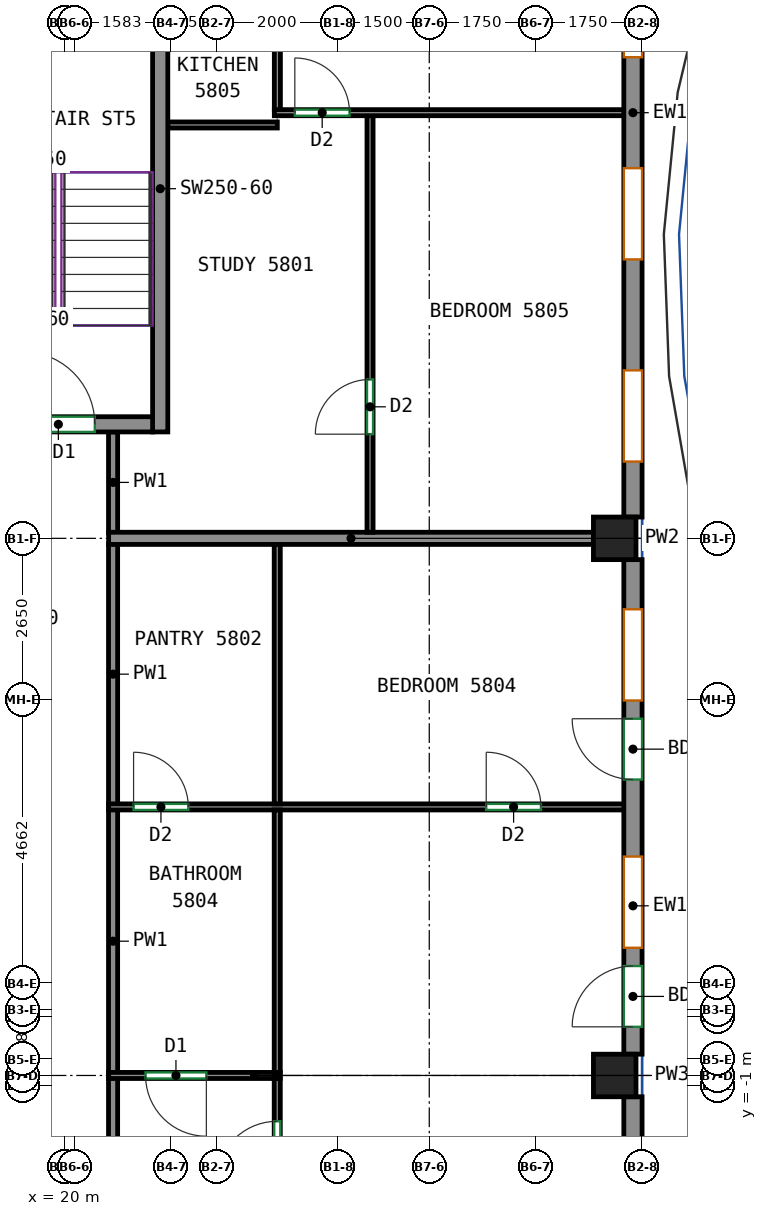
"""IFC4 building model, lengths in metres.
Left out: names, types, materials, properties, quantities, classifications, styles, units other than length and angle.
Written with IfcOpenShell. Run it as: python <this file> out.ifc"""

import sys

from ifc_helpers import new_model, si_unit, direction, frame, frame_2d, origin, origin_2d, place, context, subcontext, project, spatial, rectangle, extrude, source, transform, mapped, element, fill, save


model = new_model("IFC4")
c1 = context("Model", 3, precision=1e-05, world=origin(), true_north=direction((0.0, 1.0)))
c2 = subcontext(c1, "Body", "Model", "MODEL_VIEW")
j1 = project(units=[si_unit("LENGTHUNIT", "METRE"), si_unit("PLANEANGLEUNIT", "RADIAN")], contexts=[c1])
p1 = place(None, origin())
s1 = spatial("IfcSite", under=j1, at=p1, CompositionType="ELEMENT")
p2 = place(p1, origin())
s2 = spatial("IfcBuilding", under=s1, at=p2, CompositionType="ELEMENT")
p3 = place(p2, frame((0.0, 0.0, 242.4)))
s3 = spatial("IfcBuildingStorey", under=s2, at=p3, CompositionType="ELEMENT", Elevation=242.4)
m1 = source(origin(), c2, "Body", "SweptSolid", [
    extrude(rectangle(XDim=0.7, YDim=0.7, at=origin_2d()), origin(), (0.0, 0.0, 1.0), 3.12),
])
for number, where, z_axis, x_axis in (
    (1, (29.05, -0.833, 0.0), (0.0, 0.0, 1.0), (1.0, 0.0, 0.0)),
    (2, (29.05, 8.0, 0.0), (0.0, 0.0, 1.0), (1.0, 0.0, 0.0)),
):
    element("IfcColumn", number, at=place(p3, frame(where, z_axis=z_axis, x_axis=x_axis)), inside=s3, PredefinedType="COLUMN", context=c2, shape_type="MappedRepresentation", body=[
        mapped(m1, transform((0.0, 0.0, 0.0))),
    ])
m2 = source(origin(), c2, "Body", "SweptSolid", [
    extrude(rectangle(XDim=8.0, YDim=0.25, at=frame_2d((4.0, 0.0))), origin(), (0.0, 0.0, 1.0), 3.12),
])
p4 = place(p3, frame((21.575, 9.75, 0.0), z_axis=(0.0, 0.0, 1.0), x_axis=(0.0, 1.0, 0.0)))
e3 = element("IfcWall", 3, at=p4, inside=s3, PredefinedType="SHEAR", context=c2, shape_type="MappedRepresentation", body=[
    mapped(m2, transform((0.0, 0.0, 0.0))),
])
m3 = source(origin(), c2, "Body", "SweptSolid", [
    extrude(rectangle(XDim=3.1, YDim=0.25, at=frame_2d((1.55, 0.0))), origin(), (0.0, 0.0, 1.0), 3.12),
])
p5 = place(p3, frame((18.35, 9.875, 0.0), z_axis=(0.0, 0.0, 1.0), x_axis=(1.0, 0.0, 0.0)))
e4 = element("IfcWall", 4, at=p5, inside=s3, PredefinedType="SHEAR", context=c2, shape_type="MappedRepresentation", body=[
    mapped(m3, transform((0.0, 0.0, 0.0))),
])
p6 = place(p5, frame((0.95, 0.0, 0.0)))
e5 = element("IfcOpeningElement", 5, at=p6, cuts=e4, PredefinedType="OPENING", context=c2, shape_type="SweptSolid", body=[
    extrude(rectangle(XDim=1.2, YDim=2.1, at=frame_2d((0.6, 1.05))), frame((0.0, 0.135, 0.0), z_axis=(0.0, -1.0, 0.0), x_axis=(1.0, 0.0, 0.0)), (0.0, 0.0, 1.0), 0.27),
])
m4 = source(origin(), c2, "Body", "SweptSolid", [
    extrude(rectangle(XDim=8.133, YDim=0.3, at=frame_2d((4.067, 0.0))), origin(), (0.0, 0.0, 1.0), 3.12),
])
p7 = place(p3, frame((29.35, -9.317, 0.0), z_axis=(0.0, 0.0, 1.0), x_axis=(0.0, 1.0, 0.0)))
e6 = element("IfcWall", 6, at=p7, inside=s3, PredefinedType="SOLIDWALL", context=c2, shape_type="MappedRepresentation", body=[
    mapped(m4, transform((0.0, 0.0, 0.0))),
])
p8 = place(p7, frame((1.75, 0.0, 0.8)))
e7 = element("IfcOpeningElement", 7, at=p8, cuts=e6, PredefinedType="OPENING", context=c2, shape_type="SweptSolid", body=[
    extrude(rectangle(XDim=1.5, YDim=2.05, at=frame_2d((0.75, 1.025))), frame((0.0, 0.16, 0.0), z_axis=(0.0, -1.0, 0.0), x_axis=(1.0, 0.0, 0.0)), (0.0, 0.0, 1.0), 0.32),
])
p9 = place(p7, frame((5.817, 0.0, 0.8)))
e8 = element("IfcOpeningElement", 8, at=p9, cuts=e6, PredefinedType="OPENING", context=c2, shape_type="SweptSolid", body=[
    extrude(rectangle(XDim=1.5, YDim=2.05, at=frame_2d((0.75, 1.025))), frame((0.0, 0.16, 0.0), z_axis=(0.0, -1.0, 0.0), x_axis=(1.0, 0.0, 0.0)), (0.0, 0.0, 1.0), 0.32),
])
p10 = place(p7, frame((4.517, 0.0, 0.0)))
e9 = element("IfcOpeningElement", 9, at=p10, cuts=e6, PredefinedType="OPENING", context=c2, shape_type="SweptSolid", body=[
    extrude(rectangle(XDim=1.0, YDim=2.1, at=frame_2d((0.5, 1.05))), frame((0.0, 0.16, 0.0), z_axis=(0.0, -1.0, 0.0), x_axis=(1.0, 0.0, 0.0)), (0.0, 0.0, 1.0), 0.32),
])
p11 = place(p3, frame((29.35, -0.483, 0.0), z_axis=(0.0, 0.0, 1.0), x_axis=(0.0, 1.0, 0.0)))
e10 = element("IfcWall", 10, at=p11, inside=s3, PredefinedType="SOLIDWALL", context=c2, shape_type="MappedRepresentation", body=[
    mapped(m4, transform((0.0, 0.0, 0.0))),
])
p12 = place(p11, frame((1.75, 0.0, 0.8)))
e11 = element("IfcOpeningElement", 11, at=p12, cuts=e10, PredefinedType="OPENING", context=c2, shape_type="SweptSolid", body=[
    extrude(rectangle(XDim=1.5, YDim=2.05, at=frame_2d((0.75, 1.025))), frame((0.0, 0.16, 0.0), z_axis=(0.0, -1.0, 0.0), x_axis=(1.0, 0.0, 0.0)), (0.0, 0.0, 1.0), 0.32),
])
p13 = place(p11, frame((0.45, 0.0, 0.0)))
e12 = element("IfcOpeningElement", 12, at=p13, cuts=e10, PredefinedType="OPENING", context=c2, shape_type="SweptSolid", body=[
    extrude(rectangle(XDim=1.0, YDim=2.1, at=frame_2d((0.5, 1.05))), frame((0.0, 0.16, 0.0), z_axis=(0.0, -1.0, 0.0), x_axis=(1.0, 0.0, 0.0)), (0.0, 0.0, 1.0), 0.32),
])
p14 = place(p11, frame((5.817, 0.0, 0.8)))
e13 = element("IfcOpeningElement", 13, at=p14, cuts=e10, PredefinedType="OPENING", context=c2, shape_type="SweptSolid", body=[
    extrude(rectangle(XDim=1.5, YDim=2.05, at=frame_2d((0.75, 1.025))), frame((0.0, 0.16, 0.0), z_axis=(0.0, -1.0, 0.0), x_axis=(1.0, 0.0, 0.0)), (0.0, 0.0, 1.0), 0.32),
])
p15 = place(p11, frame((4.517, 0.0, 0.0)))
e14 = element("IfcOpeningElement", 14, at=p15, cuts=e10, PredefinedType="OPENING", context=c2, shape_type="SweptSolid", body=[
    extrude(rectangle(XDim=1.0, YDim=2.1, at=frame_2d((0.5, 1.05))), frame((0.0, 0.16, 0.0), z_axis=(0.0, -1.0, 0.0), x_axis=(1.0, 0.0, 0.0)), (0.0, 0.0, 1.0), 0.32),
])
m5 = source(origin(), c2, "Body", "SweptSolid", [
    extrude(rectangle(XDim=13.3, YDim=0.3, at=frame_2d((6.65, 0.0))), origin(), (0.0, 0.0, 1.0), 3.12),
])
p16 = place(p3, frame((29.35, 8.35, 0.0), z_axis=(0.0, 0.0, 1.0), x_axis=(0.0, 1.0, 0.0)))
e15 = element("IfcWall", 15, at=p16, inside=s3, PredefinedType="SOLIDWALL", context=c2, shape_type="MappedRepresentation", body=[
    mapped(m5, transform((0.0, 0.0, 0.0))),
])
p17 = place(p16, frame((0.913, 0.0, 0.8)))
e16 = element("IfcOpeningElement", 16, at=p17, cuts=e15, PredefinedType="OPENING", context=c2, shape_type="SweptSolid", body=[
    extrude(rectangle(XDim=1.5, YDim=2.05, at=frame_2d((0.75, 1.025))), frame((0.0, 0.16, 0.0), z_axis=(0.0, -1.0, 0.0), x_axis=(1.0, 0.0, 0.0)), (0.0, 0.0, 1.0), 0.32),
])
p18 = place(p16, frame((4.238, 0.0, 0.8)))
e17 = element("IfcOpeningElement", 17, at=p18, cuts=e15, PredefinedType="OPENING", context=c2, shape_type="SweptSolid", body=[
    extrude(rectangle(XDim=1.5, YDim=2.05, at=frame_2d((0.75, 1.025))), frame((0.0, 0.16, 0.0), z_axis=(0.0, -1.0, 0.0), x_axis=(1.0, 0.0, 0.0)), (0.0, 0.0, 1.0), 0.32),
])
p19 = place(p16, frame((7.562, 0.0, 0.8)))
e18 = element("IfcOpeningElement", 18, at=p19, cuts=e15, PredefinedType="OPENING", context=c2, shape_type="SweptSolid", body=[
    extrude(rectangle(XDim=1.5, YDim=2.05, at=frame_2d((0.75, 1.025))), frame((0.0, 0.16, 0.0), z_axis=(0.0, -1.0, 0.0), x_axis=(1.0, 0.0, 0.0)), (0.0, 0.0, 1.0), 0.32),
])
p20 = place(p16, frame((10.887, 0.0, 0.8)))
e19 = element("IfcOpeningElement", 19, at=p20, cuts=e15, PredefinedType="OPENING", context=c2, shape_type="SweptSolid", body=[
    extrude(rectangle(XDim=1.5, YDim=2.05, at=frame_2d((0.75, 1.025))), frame((0.0, 0.16, 0.0), z_axis=(0.0, -1.0, 0.0), x_axis=(1.0, 0.0, 0.0)), (0.0, 0.0, 1.0), 0.32),
])
p21 = place(p3, frame((20.8, -5.16, 0.0), z_axis=(0.0, 0.0, 1.0), x_axis=(0.0, 1.0, 0.0)))
e20 = element("IfcWall", 20, at=p21, inside=s3, PredefinedType="PARTITIONING", context=c2, shape_type="SweptSolid", body=[
    extrude(rectangle(XDim=4.287, YDim=0.15, at=frame_2d((2.144, 0.0))), origin(), (0.0, 0.0, 1.0), 3.12),
])
p22 = place(p21, frame((2.262, 0.0, 0.0)))
e21 = element("IfcOpeningElement", 21, at=p22, cuts=e20, PredefinedType="OPENING", context=c2, shape_type="SweptSolid", body=[
    extrude(rectangle(XDim=1.0, YDim=2.1, at=frame_2d((0.5, 1.05))), frame((0.0, 0.085, 0.0), z_axis=(0.0, -1.0, 0.0), x_axis=(1.0, 0.0, 0.0)), (0.0, 0.0, 1.0), 0.17),
])
p23 = place(p3, frame((20.8, -0.793, 0.0), z_axis=(0.0, 0.0, 1.0), x_axis=(0.0, 1.0, 0.0)))
e22 = element("IfcWall", 22, at=p23, inside=s3, PredefinedType="PARTITIONING", context=c2, shape_type="SweptSolid", body=[
    extrude(rectangle(XDim=4.336, YDim=0.15, at=frame_2d((2.168, 0.0))), origin(), (0.0, 0.0, 1.0), 3.12),
])
p24 = place(p3, frame((20.8, 3.623, 0.0), z_axis=(0.0, 0.0, 1.0), x_axis=(0.0, 1.0, 0.0)))
e23 = element("IfcWall", 23, at=p24, inside=s3, PredefinedType="PARTITIONING", context=c2, shape_type="SweptSolid", body=[
    extrude(rectangle(XDim=4.287, YDim=0.15, at=frame_2d((2.144, 0.0))), origin(), (0.0, 0.0, 1.0), 3.12),
])
p25 = place(p3, frame((20.8, 8.09, 0.0), z_axis=(0.0, 0.0, 1.0), x_axis=(0.0, 1.0, 0.0)))
e24 = element("IfcWall", 24, at=p25, inside=s3, PredefinedType="PARTITIONING", context=c2, shape_type="SweptSolid", body=[
    extrude(rectangle(XDim=1.66, YDim=0.15, at=frame_2d((0.83, 0.0))), origin(), (0.0, 0.0, 1.0), 3.12),
])
p26 = place(p3, frame((23.55, -0.833, 0.0), z_axis=(0.0, 0.0, 1.0), x_axis=(-1.0, 0.0, 0.0)))
e25 = element("IfcWall", 25, at=p26, inside=s3, PredefinedType="PARTITIONING", context=c2, shape_type="SweptSolid", body=[
    extrude(rectangle(XDim=2.823, YDim=0.1, at=frame_2d((1.412, 0.0))), origin(), (0.0, 0.0, 1.0), 2.57),
])
p27 = place(p26, frame((1.216, 0.0, 0.0)))
e26 = element("IfcOpeningElement", 26, at=p27, cuts=e25, PredefinedType="OPENING", context=c2, shape_type="SweptSolid", body=[
    extrude(rectangle(XDim=1.0, YDim=2.1, at=frame_2d((0.5, 1.05))), frame((0.0, 0.06, 0.0), z_axis=(0.0, -1.0, 0.0), x_axis=(1.0, 0.0, 0.0)), (0.0, 0.0, 1.0), 0.12),
])
p28 = place(p3, frame((23.5, -5.2, 0.0), z_axis=(0.0, 0.0, 1.0), x_axis=(0.0, 1.0, 0.0)))
e27 = element("IfcWall", 27, at=p28, inside=s3, PredefinedType="PARTITIONING", context=c2, shape_type="SweptSolid", body=[
    extrude(rectangle(XDim=4.317, YDim=0.1, at=frame_2d((2.158, 0.0))), origin(), (0.0, 0.0, 1.0), 3.12),
])
p29 = place(p28, frame((2.614, 0.0, 0.0)))
e28 = element("IfcOpeningElement", 28, at=p29, cuts=e27, PredefinedType="OPENING", context=c2, shape_type="SweptSolid", body=[
    extrude(rectangle(XDim=1.0, YDim=2.1, at=frame_2d((0.5, 1.05))), frame((0.0, 0.06, 0.0), z_axis=(0.0, -1.0, 0.0), x_axis=(1.0, 0.0, 0.0)), (0.0, 0.0, 1.0), 0.12),
])
p30 = place(p3, frame((20.727, 3.583, 0.0), z_axis=(0.0, 0.0, 1.0), x_axis=(1.0, 0.0, 0.0)))
e29 = element("IfcWall", 29, at=p30, inside=s3, PredefinedType="PARTITIONING", context=c2, shape_type="SweptSolid", body=[
    extrude(rectangle(XDim=8.523, YDim=0.1, at=frame_2d((4.261, 0.0))), origin(), (0.0, 0.0, 1.0), 3.12),
])
p31 = place(p30, frame((0.41, 0.0, 0.0)))
e30 = element("IfcOpeningElement", 30, at=p31, cuts=e29, PredefinedType="OPENING", context=c2, shape_type="SweptSolid", body=[
    extrude(rectangle(XDim=0.9, YDim=2.1, at=frame_2d((0.45, 1.05))), frame((0.0, 0.06, 0.0), z_axis=(0.0, -1.0, 0.0), x_axis=(1.0, 0.0, 0.0)), (0.0, 0.0, 1.0), 0.12),
])
p32 = place(p30, frame((6.21, 0.0, 0.0)))
e31 = element("IfcOpeningElement", 31, at=p32, cuts=e29, PredefinedType="OPENING", context=c2, shape_type="SweptSolid", body=[
    extrude(rectangle(XDim=0.9, YDim=2.1, at=frame_2d((0.45, 1.05))), frame((0.0, 0.06, 0.0), z_axis=(0.0, -1.0, 0.0), x_axis=(1.0, 0.0, 0.0)), (0.0, 0.0, 1.0), 0.12),
])
p33 = place(p3, frame((23.5, -0.783, 0.0), z_axis=(0.0, 0.0, 1.0), x_axis=(0.0, 1.0, 0.0)))
e32 = element("IfcWall", 32, at=p33, inside=s3, PredefinedType="PARTITIONING", context=c2, shape_type="SweptSolid", body=[
    extrude(rectangle(XDim=4.316, YDim=0.1, at=frame_2d((2.158, 0.0))), origin(), (0.0, 0.0, 1.0), 3.12),
])
p34 = place(p3, frame((23.5, 3.633, 0.0), z_axis=(0.0, 0.0, 1.0), x_axis=(0.0, 1.0, 0.0)))
e33 = element("IfcWall", 33, at=p34, inside=s3, PredefinedType="PARTITIONING", context=c2, shape_type="SweptSolid", body=[
    extrude(rectangle(XDim=4.267, YDim=0.1, at=frame_2d((2.133, 0.0))), origin(), (0.0, 0.0, 1.0), 3.12),
])
p35 = place(p3, frame((20.727, 8.0, 0.0), z_axis=(0.0, 0.0, 1.0), x_axis=(1.0, 0.0, 0.0)))
e34 = element("IfcWall", 34, at=p35, inside=s3, PredefinedType="PARTITIONING", context=c2, shape_type="SweptSolid", body=[
    extrude(rectangle(XDim=7.973, YDim=0.2, at=frame_2d((3.986, 0.0))), origin(), (0.0, 0.0, 1.0), 2.57),
])
p36 = place(p3, frame((25.026, 8.1, 0.0), z_axis=(0.0, 0.0, 1.0), x_axis=(0.0, 1.0, 0.0)))
e35 = element("IfcWall", 35, at=p36, inside=s3, PredefinedType="PARTITIONING", context=c2, shape_type="SweptSolid", body=[
    extrude(rectangle(XDim=6.85, YDim=0.1, at=frame_2d((3.425, 0.0))), origin(), (0.0, 0.0, 1.0), 3.12),
])
p37 = place(p36, frame((1.613, 0.0, 0.0)))
e36 = element("IfcOpeningElement", 36, at=p37, cuts=e35, PredefinedType="OPENING", context=c2, shape_type="SweptSolid", body=[
    extrude(rectangle(XDim=0.9, YDim=2.1, at=frame_2d((0.45, 1.05))), frame((0.0, 0.06, 0.0), z_axis=(0.0, -1.0, 0.0), x_axis=(1.0, 0.0, 0.0)), (0.0, 0.0, 1.0), 0.12),
])
p38 = place(p3, frame((23.452, 15.0, 0.0), z_axis=(0.0, 0.0, 1.0), x_axis=(1.0, 0.0, 0.0)))
e37 = element("IfcWall", 37, at=p38, inside=s3, PredefinedType="PARTITIONING", context=c2, shape_type="SweptSolid", body=[
    extrude(rectangle(XDim=5.798, YDim=0.1, at=frame_2d((2.899, 0.0))), origin(), (0.0, 0.0, 1.0), 3.12),
])
p39 = place(p38, frame((0.337, 0.0, 0.0)))
e38 = element("IfcOpeningElement", 38, at=p39, cuts=e37, PredefinedType="OPENING", context=c2, shape_type="SweptSolid", body=[
    extrude(rectangle(XDim=0.9, YDim=2.1, at=frame_2d((0.45, 1.05))), frame((0.0, 0.06, 0.0), z_axis=(0.0, -1.0, 0.0), x_axis=(1.0, 0.0, 0.0)), (0.0, 0.0, 1.0), 0.12),
])
p40 = place(p3, frame((23.501, 14.798, 0.0), z_axis=(0.0, 0.0, 1.0), x_axis=(-1.0, 0.0, 0.0)))
e39 = element("IfcWall", 39, at=p40, inside=s3, PredefinedType="PARTITIONING", context=c2, shape_type="SweptSolid", body=[
    extrude(rectangle(XDim=1.801, YDim=0.1, at=frame_2d((0.9, 0.0))), origin(), (0.0, 0.0, 1.0), 3.12),
])
p41 = place(p3, frame((23.502, 15.05, 0.0), z_axis=(0.0, 0.0, 1.0), x_axis=(0.0, 1.0, 0.0)))
e40 = element("IfcWall", 40, at=p41, inside=s3, PredefinedType="PARTITIONING", context=c2, shape_type="SweptSolid", body=[
    extrude(rectangle(XDim=2.158, YDim=0.1, at=frame_2d((1.079, 0.0))), origin(), (0.0, 0.0, 1.0), 3.12),
])
p42 = place(p12, origin())
e41 = element("IfcWindow", 41, at=p42, inside=s3, PartitioningType="SINGLE_PANEL", PredefinedType="WINDOW", context=c2, shape_type="SweptSolid", body=[
    extrude(rectangle(XDim=1.5, YDim=2.05, at=frame_2d((0.75, 1.025))), frame((0.0, 0.03, 0.0), z_axis=(0.0, -1.0, 0.0), x_axis=(1.0, 0.0, 0.0)), (0.0, 0.0, 1.0), 0.06),
])
fill(e11, e41)
p43 = place(p13, origin())
e42 = element("IfcDoor", 42, at=p43, inside=s3, OperationType="SINGLE_SWING_LEFT", PredefinedType="DOOR", context=c2, shape_type="SweptSolid", body=[
    extrude(rectangle(XDim=1.0, YDim=2.1, at=frame_2d((0.5, 1.05))), frame((0.0, 0.025, 0.0), z_axis=(0.0, -1.0, 0.0), x_axis=(1.0, 0.0, 0.0)), (0.0, 0.0, 1.0), 0.05),
])
fill(e12, e42)
p44 = place(p14, origin())
e43 = element("IfcWindow", 43, at=p44, inside=s3, PartitioningType="SINGLE_PANEL", PredefinedType="WINDOW", context=c2, shape_type="SweptSolid", body=[
    extrude(rectangle(XDim=1.5, YDim=2.05, at=frame_2d((0.75, 1.025))), frame((0.0, 0.03, 0.0), z_axis=(0.0, -1.0, 0.0), x_axis=(1.0, 0.0, 0.0)), (0.0, 0.0, 1.0), 0.06),
])
fill(e13, e43)
p45 = place(p15, origin())
e44 = element("IfcDoor", 44, at=p45, inside=s3, OperationType="SINGLE_SWING_RIGHT", PredefinedType="DOOR", context=c2, shape_type="SweptSolid", body=[
    extrude(rectangle(XDim=1.0, YDim=2.1, at=frame_2d((0.5, 1.05))), frame((0.0, 0.025, 0.0), z_axis=(0.0, -1.0, 0.0), x_axis=(1.0, 0.0, 0.0)), (0.0, 0.0, 1.0), 0.05),
])
fill(e14, e44)
p46 = place(p17, origin())
e45 = element("IfcWindow", 45, at=p46, inside=s3, PartitioningType="SINGLE_PANEL", PredefinedType="WINDOW", context=c2, shape_type="SweptSolid", body=[
    extrude(rectangle(XDim=1.5, YDim=2.05, at=frame_2d((0.75, 1.025))), frame((0.0, 0.03, 0.0), z_axis=(0.0, -1.0, 0.0), x_axis=(1.0, 0.0, 0.0)), (0.0, 0.0, 1.0), 0.06),
])
fill(e16, e45)
p47 = place(p18, origin())
e46 = element("IfcWindow", 46, at=p47, inside=s3, PartitioningType="SINGLE_PANEL", PredefinedType="WINDOW", context=c2, shape_type="SweptSolid", body=[
    extrude(rectangle(XDim=1.5, YDim=2.05, at=frame_2d((0.75, 1.025))), frame((0.0, 0.03, 0.0), z_axis=(0.0, -1.0, 0.0), x_axis=(1.0, 0.0, 0.0)), (0.0, 0.0, 1.0), 0.06),
])
fill(e17, e46)
p48 = place(p19, origin())
e47 = element("IfcWindow", 47, at=p48, inside=s3, PartitioningType="SINGLE_PANEL", PredefinedType="WINDOW", context=c2, shape_type="SweptSolid", body=[
    extrude(rectangle(XDim=1.5, YDim=2.05, at=frame_2d((0.75, 1.025))), frame((0.0, 0.03, 0.0), z_axis=(0.0, -1.0, 0.0), x_axis=(1.0, 0.0, 0.0)), (0.0, 0.0, 1.0), 0.06),
])
fill(e18, e47)
p49 = place(p6, origin())
e48 = element("IfcDoor", 48, at=p49, inside=s3, OperationType="DOUBLE_DOOR_SINGLE_SWING", PredefinedType="DOOR", context=c2, shape_type="SweptSolid", body=[
    extrude(rectangle(XDim=1.2, YDim=2.1, at=frame_2d((0.6, 1.05))), frame((0.0, 0.025, 0.0), z_axis=(0.0, -1.0, 0.0), x_axis=(1.0, 0.0, 0.0)), (0.0, 0.0, 1.0), 0.05),
])
fill(e5, e48)
p50 = place(p29, origin())
e49 = element("IfcDoor", 49, at=p50, inside=s3, OperationType="SINGLE_SWING_LEFT", PredefinedType="DOOR", context=c2, shape_type="SweptSolid", body=[
    extrude(rectangle(XDim=1.0, YDim=2.1, at=frame_2d((0.5, 1.05))), frame((0.0, 0.025, 0.0), z_axis=(0.0, -1.0, 0.0), x_axis=(1.0, 0.0, 0.0)), (0.0, 0.0, 1.0), 0.05),
])
fill(e28, e49)
p51 = place(p27, origin())
e50 = element("IfcDoor", 50, at=p51, inside=s3, OperationType="SINGLE_SWING_LEFT", PredefinedType="DOOR", context=c2, shape_type="SweptSolid", body=[
    extrude(rectangle(XDim=1.0, YDim=2.1, at=frame_2d((0.5, 1.05))), frame((0.0, 0.025, 0.0), z_axis=(0.0, -1.0, 0.0), x_axis=(1.0, 0.0, 0.0)), (0.0, 0.0, 1.0), 0.05),
])
fill(e26, e50)
p52 = place(p31, origin())
e51 = element("IfcDoor", 51, at=p52, inside=s3, OperationType="SINGLE_SWING_LEFT", PredefinedType="DOOR", context=c2, shape_type="SweptSolid", body=[
    extrude(rectangle(XDim=0.9, YDim=2.1, at=frame_2d((0.45, 1.05))), frame((0.0, 0.025, 0.0), z_axis=(0.0, -1.0, 0.0), x_axis=(1.0, 0.0, 0.0)), (0.0, 0.0, 1.0), 0.05),
])
fill(e30, e51)
p53 = place(p32, origin())
e52 = element("IfcDoor", 52, at=p53, inside=s3, OperationType="SINGLE_SWING_LEFT", PredefinedType="DOOR", context=c2, shape_type="SweptSolid", body=[
    extrude(rectangle(XDim=0.9, YDim=2.1, at=frame_2d((0.45, 1.05))), frame((0.0, 0.025, 0.0), z_axis=(0.0, -1.0, 0.0), x_axis=(1.0, 0.0, 0.0)), (0.0, 0.0, 1.0), 0.05),
])
fill(e31, e52)
p54 = place(p37, origin())
e53 = element("IfcDoor", 53, at=p54, inside=s3, OperationType="SINGLE_SWING_LEFT", PredefinedType="DOOR", context=c2, shape_type="SweptSolid", body=[
    extrude(rectangle(XDim=0.9, YDim=2.1, at=frame_2d((0.45, 1.05))), frame((0.0, 0.025, 0.0), z_axis=(0.0, -1.0, 0.0), x_axis=(1.0, 0.0, 0.0)), (0.0, 0.0, 1.0), 0.05),
])
fill(e36, e53)
p55 = place(p39, origin())
e54 = element("IfcDoor", 54, at=p55, inside=s3, OperationType="SINGLE_SWING_LEFT", PredefinedType="DOOR", context=c2, shape_type="SweptSolid", body=[
    extrude(rectangle(XDim=0.9, YDim=2.1, at=frame_2d((0.45, 1.05))), frame((0.0, 0.025, 0.0), z_axis=(0.0, -1.0, 0.0), x_axis=(1.0, 0.0, 0.0)), (0.0, 0.0, 1.0), 0.05),
])
fill(e38, e54)
save(model, sys.argv[1])
